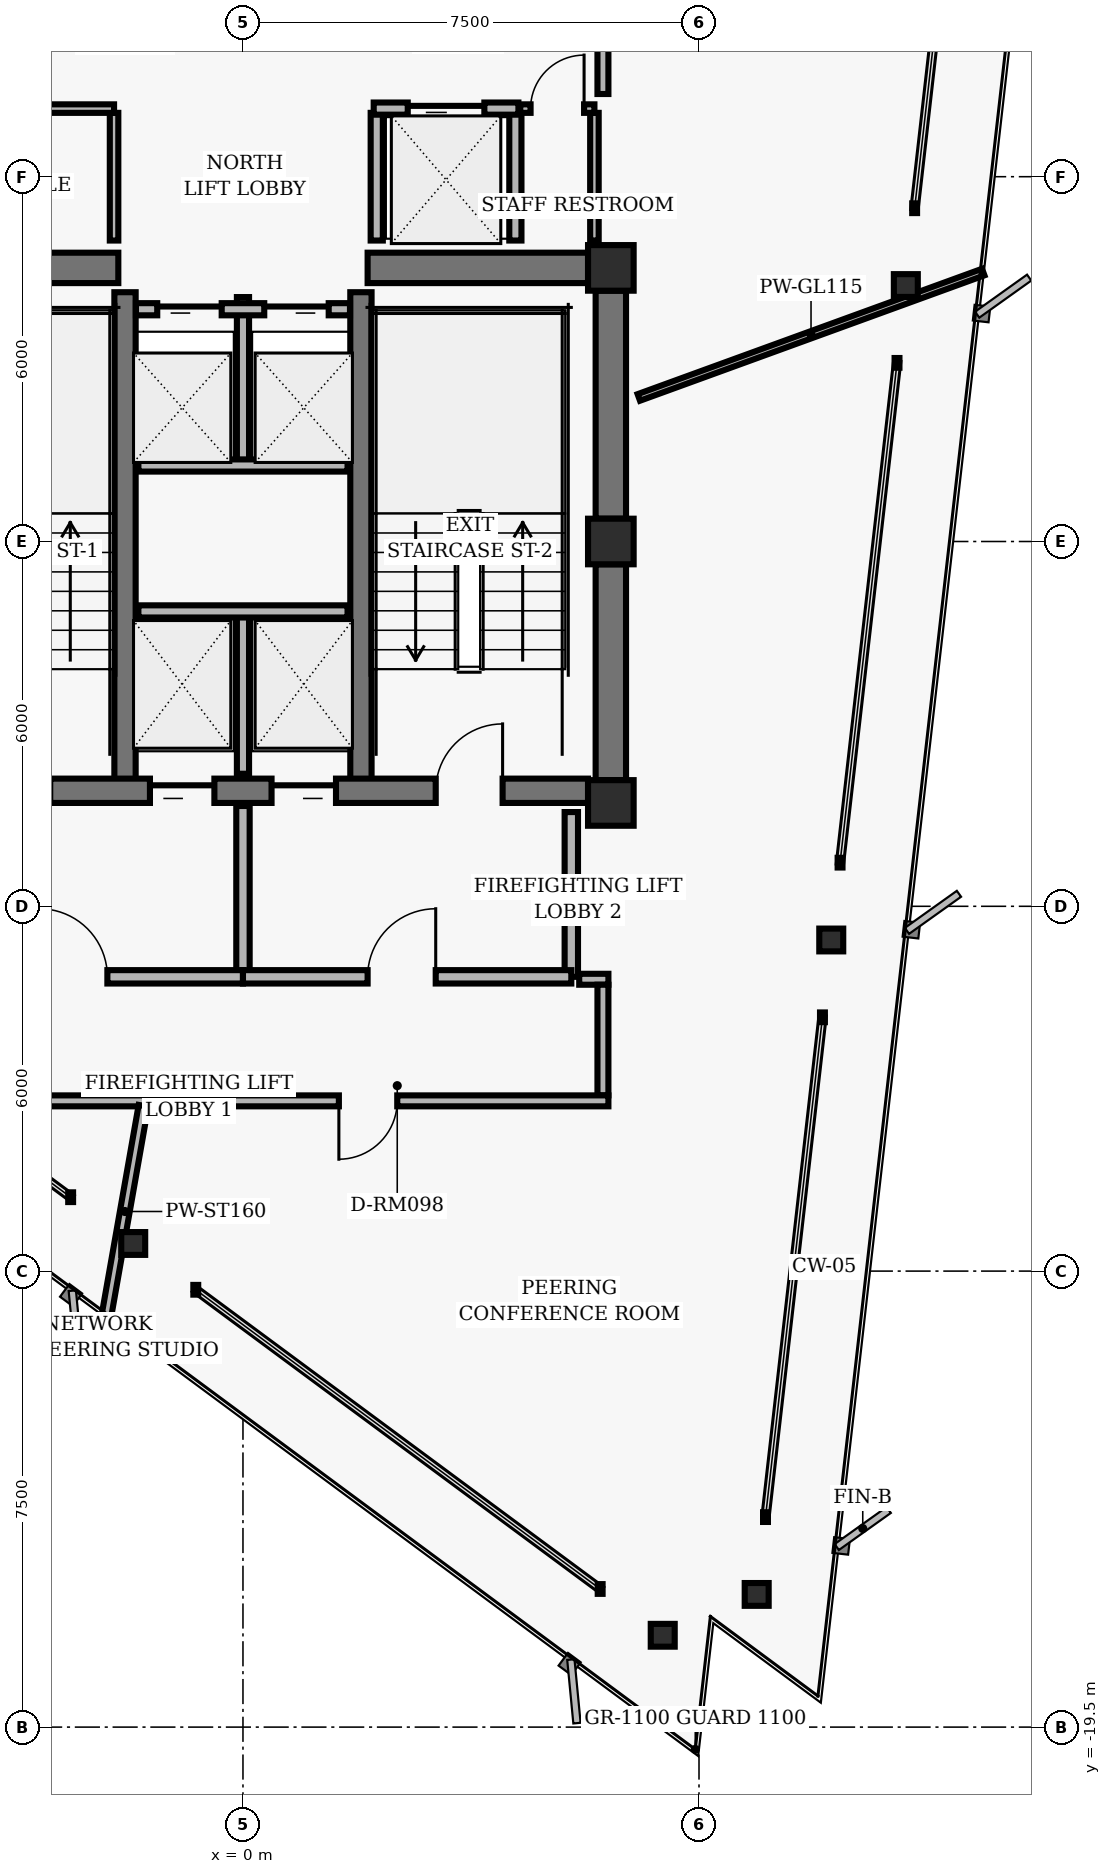
"""IFC4 building model, lengths in metres.
Left out: names, types, materials, properties, quantities, classifications, styles, units other than length and angle.
Written with IfcOpenShell. Run it as: python <this file> out.ifc"""

import sys

from ifc_helpers import new_model, si_unit, direction, frame, frame_2d, origin, origin_2d, place, context, subcontext, project, spatial, rectangle, hollow_rectangle, i_section, extrude, element, fill, save


model = new_model("IFC4")
c1 = context("Model", 3, precision=1e-05, world=origin(), true_north=direction((0.0, 1.0)))
c2 = subcontext(c1, "Body", "Model", "MODEL_VIEW")
j1 = project(units=[si_unit("LENGTHUNIT", "METRE"), si_unit("PLANEANGLEUNIT", "RADIAN")], contexts=[c1])
p1 = place(None, origin())
s1 = spatial("IfcSite", under=j1, at=p1, CompositionType="ELEMENT")
p2 = place(p1, origin())
s2 = spatial("IfcBuilding", under=s1, at=p2, CompositionType="ELEMENT")
p3 = place(p2, frame((0.0, 0.0, 214.88)))
s3 = spatial("IfcBuildingStorey", under=s2, at=p3, CompositionType="ELEMENT", Elevation=214.88)
for number, where, z_axis, x_axis in (
    (1, (6.05, 4.5, 0.0), (0.0, 0.0, 1.0), (1.0, 0.0, 0.0)),
    (2, (6.05, 0.0, 0.0), (0.0, 0.0, 1.0), (1.0, 0.0, 0.0)),
    (3, (6.05, -4.3, 0.0), (0.0, 0.0, 1.0), (1.0, 0.0, 0.0)),
):
    element("IfcColumn", number, at=place(p3, frame(where, z_axis=z_axis, x_axis=x_axis)), inside=s3, PredefinedType="COLUMN", context=c2, shape_type="SweptSolid", body=[
        extrude(hollow_rectangle(XDim=0.75, YDim=0.75, WallThickness=0.05, InnerFilletRadius=0.02, OuterFilletRadius=0.04, at=origin_2d()), origin(), (0.0, 0.0, 1.0), 3.04),
    ])
p4 = place(p3, frame((6.05, 0.375, 0.0), z_axis=(0.0, 0.0, 1.0), x_axis=(0.0, 1.0, 0.0)))
e4 = element("IfcWall", 4, at=p4, inside=s3, PredefinedType="SHEAR", context=c2, shape_type="SweptSolid", body=[
    extrude(rectangle(XDim=3.75, YDim=0.5, at=frame_2d((1.875, 0.0))), origin(), (0.0, 0.0, 1.0), 2.798),
])
p5 = place(p3, frame((6.05, -3.925, 0.0), z_axis=(0.0, 0.0, 1.0), x_axis=(0.0, 1.0, 0.0)))
e5 = element("IfcWall", 5, at=p5, inside=s3, PredefinedType="SHEAR", context=c2, shape_type="SweptSolid", body=[
    extrude(rectangle(XDim=3.55, YDim=0.5, at=frame_2d((1.775, 0.0))), origin(), (0.0, 0.0, 1.0), 2.798),
])
for number, where, z_axis, x_axis in (
    (6, (-1.94, -4.1, 0.0), (0.0, 0.0, 1.0), (0.0, 1.0, 0.0)),
    (7, (1.94, -4.1, 0.0), (0.0, 0.0, 1.0), (0.0, 1.0, 0.0)),
):
    element("IfcWall", number, at=place(p3, frame(where, z_axis=z_axis, x_axis=x_axis)), inside=s3, PredefinedType="SHEAR", context=c2, shape_type="SweptSolid", body=[
        extrude(rectangle(XDim=8.2, YDim=0.35, at=frame_2d((4.1, 0.0))), origin(), (0.0, 0.0, 1.0), 2.798),
    ])
p6 = place(p3, frame((-5.675, -4.1, 0.0), z_axis=(0.0, 0.0, 1.0), x_axis=(1.0, 0.0, 0.0)))
e8 = element("IfcWall", 8, at=p6, inside=s3, PredefinedType="SHEAR", context=c2, shape_type="SweptSolid", body=[
    extrude(rectangle(XDim=11.35, YDim=0.4, at=frame_2d((5.675, 0.0))), origin(), (0.0, 0.0, 1.0), 2.798),
])
p7 = place(p6, frame((1.405, 0.0, 0.0)))
e9 = element("IfcOpeningElement", 9, at=p7, cuts=e8, PredefinedType="OPENING", context=c2, shape_type="SweptSolid", body=[
    extrude(rectangle(XDim=1.1, YDim=2.04, at=frame_2d((0.55, 1.02))), frame((0.0, 0.21, 0.0), z_axis=(0.0, -1.0, 0.0), x_axis=(1.0, 0.0, 0.0)), (0.0, 0.0, 1.0), 0.42),
])
p8 = place(p6, frame((8.845, 0.0, 0.0)))
e10 = element("IfcOpeningElement", 10, at=p8, cuts=e8, PredefinedType="OPENING", context=c2, shape_type="SweptSolid", body=[
    extrude(rectangle(XDim=1.1, YDim=2.04, at=frame_2d((0.55, 1.02))), frame((0.0, 0.21, 0.0), z_axis=(0.0, -1.0, 0.0), x_axis=(1.0, 0.0, 0.0)), (0.0, 0.0, 1.0), 0.42),
])
p9 = place(p6, frame((4.145, 0.0, 0.0)))
e11 = element("IfcOpeningElement", 11, at=p9, cuts=e8, PredefinedType="OPENING", context=c2, shape_type="SweptSolid", body=[
    extrude(rectangle(XDim=1.06, YDim=2.04, at=frame_2d((0.53, 1.02))), frame((0.0, 0.21, 0.0), z_axis=(0.0, -1.0, 0.0), x_axis=(1.0, 0.0, 0.0)), (0.0, 0.0, 1.0), 0.42),
])
p10 = place(p6, frame((6.145, 0.0, 0.0)))
e12 = element("IfcOpeningElement", 12, at=p10, cuts=e8, PredefinedType="OPENING", context=c2, shape_type="SweptSolid", body=[
    extrude(rectangle(XDim=1.06, YDim=2.04, at=frame_2d((0.53, 1.02))), frame((0.0, 0.21, 0.0), z_axis=(0.0, -1.0, 0.0), x_axis=(1.0, 0.0, 0.0)), (0.0, 0.0, 1.0), 0.42),
])
for number, where, z_axis, x_axis in (
    (13, (-5.675, 4.5, 0.0), (0.0, 0.0, 1.0), (1.0, 0.0, 0.0)),
    (14, (2.05, 4.5, 0.0), (0.0, 0.0, 1.0), (1.0, 0.0, 0.0)),
):
    element("IfcWall", number, at=place(p3, frame(where, z_axis=z_axis, x_axis=x_axis)), inside=s3, PredefinedType="SHEAR", context=c2, shape_type="SweptSolid", body=[
        extrude(rectangle(XDim=3.625, YDim=0.5, at=frame_2d((1.812, 0.0))), origin(), (0.0, 0.0, 1.0), 2.798),
    ])
for number, where, z_axis, x_axis in (
    (15, (8.448, -17.318, 0.0), (0.0, 0.0, 1.0), (1.0, 0.0, 0.0)),
    (16, (9.675, -6.554, 0.0), (0.0, 0.0, 1.0), (1.0, 0.0, 0.0)),
    (17, (10.901, 4.21, 0.0), (0.0, 0.0, 1.0), (1.0, 0.0, 0.0)),
    (18, (-1.805, -11.546, 0.0), (0.0, 0.0, 1.0), (1.0, 0.0, 0.0)),
    (19, (6.903, -17.99, 0.0), (0.0, 0.0, 1.0), (1.0, 0.0, 0.0)),
):
    element("IfcColumn", number, at=place(p3, frame(where, z_axis=z_axis, x_axis=x_axis)), inside=s3, PredefinedType="COLUMN", context=c2, shape_type="SweptSolid", body=[
        extrude(i_section(OverallWidth=0.394, OverallDepth=0.375, WebThickness=0.017, FlangeThickness=0.028, FilletRadius=0.016, at=origin_2d()), origin(), (0.0, 0.0, 1.0), 3.04),
    ])
p11 = place(p3, frame((0.0, -3.82, 0.0), z_axis=(0.0, 0.0, 1.0), x_axis=(0.0, 1.0, 0.0)))
e20 = element("IfcWall", 20, at=p11, inside=s3, PredefinedType="PARTITIONING", context=c2, shape_type="SweptSolid", body=[
    extrude(rectangle(XDim=2.67, YDim=0.2, at=frame_2d((1.335, 0.0))), origin(), (0.0, 0.0, 1.0), 2.773),
])
p12 = place(p3, frame((-1.72, -1.15, 0.0), z_axis=(0.0, 0.0, 1.0), x_axis=(1.0, 0.0, 0.0)))
e21 = element("IfcWall", 21, at=p12, inside=s3, PredefinedType="PARTITIONING", context=c2, shape_type="SweptSolid", body=[
    extrude(rectangle(XDim=3.44, YDim=0.2, at=frame_2d((1.72, 0.0))), origin(), (0.0, 0.0, 1.0), 2.773),
])
p13 = place(p3, frame((5.4, -7.16, 0.0), z_axis=(0.0, 0.0, 1.0), x_axis=(0.0, 1.0, 0.0)))
e22 = element("IfcWall", 22, at=p13, inside=s3, PredefinedType="PARTITIONING", context=c2, shape_type="SweptSolid", body=[
    extrude(rectangle(XDim=2.71, YDim=0.22, at=frame_2d((1.355, 0.0))), origin(), (0.0, 0.0, 1.0), 2.773),
])
p14 = place(p3, frame((0.0, -7.16, 0.0), z_axis=(0.0, 0.0, 1.0), x_axis=(0.0, 1.0, 0.0)))
e23 = element("IfcWall", 23, at=p14, inside=s3, PredefinedType="PARTITIONING", context=c2, shape_type="SweptSolid", body=[
    extrude(rectangle(XDim=2.81, YDim=0.22, at=frame_2d((1.405, 0.0))), origin(), (0.0, 0.0, 1.0), 2.773),
])
p15 = place(p3, frame((-5.4, -7.16, 0.0), z_axis=(0.0, 0.0, 1.0), x_axis=(1.0, 0.0, 0.0)))
e24 = element("IfcWall", 24, at=p15, inside=s3, PredefinedType="PARTITIONING", context=c2, shape_type="SweptSolid", body=[
    extrude(rectangle(XDim=5.4, YDim=0.22, at=frame_2d((2.7, 0.0))), origin(), (0.0, 0.0, 1.0), 2.395),
])
p16 = place(p15, frame((2.05, 0.0, 0.0)))
e25 = element("IfcOpeningElement", 25, at=p16, cuts=e24, PredefinedType="OPENING", context=c2, shape_type="SweptSolid", body=[
    extrude(rectangle(XDim=1.12, YDim=2.02, at=frame_2d((0.56, 1.01))), frame((0.0, 0.12, 0.0), z_axis=(0.0, -1.0, 0.0), x_axis=(1.0, 0.0, 0.0)), (0.0, 0.0, 1.0), 0.24),
])
p17 = place(p3, frame((0.0, -7.16, 0.0), z_axis=(0.0, 0.0, 1.0), x_axis=(1.0, 0.0, 0.0)))
e26 = element("IfcWall", 26, at=p17, inside=s3, PredefinedType="PARTITIONING", context=c2, shape_type="SweptSolid", body=[
    extrude(rectangle(XDim=5.4, YDim=0.22, at=frame_2d((2.7, 0.0))), origin(), (0.0, 0.0, 1.0), 2.773),
])
p18 = place(p17, frame((2.05, 0.0, 0.0)))
e27 = element("IfcOpeningElement", 27, at=p18, cuts=e26, PredefinedType="OPENING", context=c2, shape_type="SweptSolid", body=[
    extrude(rectangle(XDim=1.12, YDim=2.02, at=frame_2d((0.56, 1.01))), frame((0.0, 0.12, 0.0), z_axis=(0.0, -1.0, 0.0), x_axis=(1.0, 0.0, 0.0)), (0.0, 0.0, 1.0), 0.24),
])
p19 = place(p3, frame((0.0, 1.25, 0.0), z_axis=(0.0, 0.0, 1.0), x_axis=(0.0, 1.0, 0.0)))
e28 = element("IfcWall", 28, at=p19, inside=s3, PredefinedType="PARTITIONING", context=c2, shape_type="SweptSolid", body=[
    extrude(rectangle(XDim=2.77, YDim=0.2, at=frame_2d((1.385, 0.0))), origin(), (0.0, 0.0, 1.0), 2.773),
])
p20 = place(p3, frame((-1.72, 1.25, 0.0), z_axis=(0.0, 0.0, 1.0), x_axis=(1.0, 0.0, 0.0)))
e29 = element("IfcWall", 29, at=p20, inside=s3, PredefinedType="PARTITIONING", context=c2, shape_type="SweptSolid", body=[
    extrude(rectangle(XDim=3.44, YDim=0.2, at=frame_2d((1.72, 0.0))), origin(), (0.0, 0.0, 1.0), 2.773),
])
p21 = place(p3, frame((-1.76, 3.82, 0.0), z_axis=(0.0, 0.0, 1.0), x_axis=(1.0, 0.0, 0.0)))
e30 = element("IfcWall", 30, at=p21, inside=s3, PredefinedType="PARTITIONING", context=c2, shape_type="SweptSolid", body=[
    extrude(rectangle(XDim=3.52, YDim=0.2, at=frame_2d((1.76, 0.0))), origin(), (0.0, 0.0, 1.0), 2.773),
])
p22 = place(p21, frame((0.35, 0.0, 0.0)))
e31 = element("IfcOpeningElement", 31, at=p22, cuts=e30, PredefinedType="OPENING", context=c2, shape_type="SweptSolid", body=[
    extrude(rectangle(XDim=1.06, YDim=2.04, at=frame_2d((0.53, 1.02))), frame((0.0, 0.11, 0.0), z_axis=(0.0, -1.0, 0.0), x_axis=(1.0, 0.0, 0.0)), (0.0, 0.0, 1.0), 0.22),
])
p23 = place(p21, frame((2.11, 0.0, 0.0)))
e32 = element("IfcOpeningElement", 32, at=p23, cuts=e30, PredefinedType="OPENING", context=c2, shape_type="SweptSolid", body=[
    extrude(rectangle(XDim=1.06, YDim=2.04, at=frame_2d((0.53, 1.02))), frame((0.0, 0.11, 0.0), z_axis=(0.0, -1.0, 0.0), x_axis=(1.0, 0.0, 0.0)), (0.0, 0.0, 1.0), 0.22),
])
for number, where, z_axis, x_axis in (
    (33, (2.2, 4.95, 0.0), (0.0, 0.0, 1.0), (0.0, 1.0, 0.0)),
    (34, (4.48, 4.95, 0.0), (0.0, 0.0, 1.0), (0.0, 1.0, 0.0)),
):
    element("IfcWall", number, at=place(p3, frame(where, z_axis=z_axis, x_axis=x_axis)), inside=s3, PredefinedType="PARTITIONING", context=c2, shape_type="SweptSolid", body=[
        extrude(rectangle(XDim=2.1, YDim=0.2, at=frame_2d((1.05, 0.0))), origin(), (0.0, 0.0, 1.0), 2.773),
    ])
p24 = place(p3, frame((2.15, 7.12, 0.0), z_axis=(0.0, 0.0, 1.0), x_axis=(1.0, 0.0, 0.0)))
e35 = element("IfcWall", 35, at=p24, inside=s3, PredefinedType="PARTITIONING", context=c2, shape_type="SweptSolid", body=[
    extrude(rectangle(XDim=2.38, YDim=0.2, at=frame_2d((1.19, 0.0))), origin(), (0.0, 0.0, 1.0), 2.395),
])
p25 = place(p24, frame((0.56, 0.0, 0.0)))
e36 = element("IfcOpeningElement", 36, at=p25, cuts=e35, PredefinedType="OPENING", context=c2, shape_type="SweptSolid", body=[
    extrude(rectangle(XDim=1.26, YDim=2.06, at=frame_2d((0.63, 1.03))), frame((0.0, 0.11, 0.0), z_axis=(0.0, -1.0, 0.0), x_axis=(1.0, 0.0, 0.0)), (0.0, 0.0, 1.0), 0.22),
])
p26 = place(p3, frame((-2.12, 4.95, 0.0), z_axis=(0.0, 0.0, 1.0), x_axis=(0.0, 1.0, 0.0)))
e37 = element("IfcWall", 37, at=p26, inside=s3, PredefinedType="PARTITIONING", context=c2, shape_type="SweptSolid", body=[
    extrude(rectangle(XDim=2.1, YDim=0.14, at=frame_2d((1.05, 0.0))), origin(), (0.0, 0.0, 1.0), 2.773),
])
p27 = place(p3, frame((-5.48, 7.12, 0.0), z_axis=(0.0, 0.0, 1.0), x_axis=(1.0, 0.0, 0.0)))
e38 = element("IfcWall", 38, at=p27, inside=s3, PredefinedType="PARTITIONING", context=c2, shape_type="SweptSolid", body=[
    extrude(rectangle(XDim=3.36, YDim=0.14, at=frame_2d((1.68, 0.0))), origin(), (0.0, 0.0, 1.0), 2.395),
])
p28 = place(p27, frame((1.24, 0.0, 0.0)))
e39 = element("IfcOpeningElement", 39, at=p28, cuts=e38, PredefinedType="OPENING", context=c2, shape_type="SweptSolid", body=[
    extrude(rectangle(XDim=0.88, YDim=2.02, at=frame_2d((0.44, 1.01))), frame((0.0, 0.08, 0.0), z_axis=(0.0, -1.0, 0.0), x_axis=(1.0, 0.0, 0.0)), (0.0, 0.0, 1.0), 0.16),
])
p29 = place(p3, frame((5.78, 4.95, 0.0), z_axis=(0.0, 0.0, 1.0), x_axis=(0.0, 1.0, 0.0)))
e40 = element("IfcWall", 40, at=p29, inside=s3, PredefinedType="PARTITIONING", context=c2, shape_type="SweptSolid", body=[
    extrude(rectangle(XDim=2.1, YDim=0.14, at=frame_2d((1.05, 0.0))), origin(), (0.0, 0.0, 1.0), 2.773),
])
p30 = place(p3, frame((4.56, 7.12, 0.0), z_axis=(0.0, 0.0, 1.0), x_axis=(1.0, 0.0, 0.0)))
e41 = element("IfcWall", 41, at=p30, inside=s3, PredefinedType="PARTITIONING", context=c2, shape_type="SweptSolid", body=[
    extrude(rectangle(XDim=1.22, YDim=0.14, at=frame_2d((0.61, 0.0))), origin(), (0.0, 0.0, 1.0), 2.773),
])
p31 = place(p30, frame((0.17, 0.0, 0.0)))
e42 = element("IfcOpeningElement", 42, at=p31, cuts=e41, PredefinedType="OPENING", context=c2, shape_type="SweptSolid", body=[
    extrude(rectangle(XDim=0.88, YDim=2.02, at=frame_2d((0.44, 1.01))), frame((0.0, 0.08, 0.0), z_axis=(0.0, -1.0, 0.0), x_axis=(1.0, 0.0, 0.0)), (0.0, 0.0, 1.0), 0.16),
])
p32 = place(p3, frame((5.92, 9.16, 0.0), z_axis=(0.0, 0.0, 1.0), x_axis=(0.0, -1.0, 0.0)))
e43 = element("IfcWall", 43, at=p32, inside=s3, PredefinedType="PARTITIONING", context=c2, shape_type="SweptSolid", body=[
    extrude(rectangle(XDim=1.8, YDim=0.18, at=frame_2d((0.9, 0.0))), origin(), (0.0, 0.0, 1.0), 2.773),
])
p33 = place(p3, frame((5.53, -7.2, 0.0), z_axis=(0.0, 0.0, 1.0), x_axis=(1.0, 0.0, 0.0)))
e44 = element("IfcWall", 44, at=p33, inside=s3, PredefinedType="PARTITIONING", context=c2, shape_type="SweptSolid", body=[
    extrude(rectangle(XDim=0.48, YDim=0.18, at=frame_2d((0.24, 0.0))), origin(), (0.0, 0.0, 1.0), 2.773),
])
p34 = place(p3, frame((5.92, -7.29, 0.0), z_axis=(0.0, 0.0, 1.0), x_axis=(0.0, -1.0, 0.0)))
e45 = element("IfcWall", 45, at=p34, inside=s3, PredefinedType="PARTITIONING", context=c2, shape_type="SweptSolid", body=[
    extrude(rectangle(XDim=1.82, YDim=0.18, at=frame_2d((0.91, 0.0))), origin(), (0.0, 0.0, 1.0), 2.253),
])
p35 = place(p3, frame((6.01, -9.2, 0.0), z_axis=(0.0, 0.0, 1.0), x_axis=(-1.0, 0.0, 0.0)))
e46 = element("IfcWall", 46, at=p35, inside=s3, PredefinedType="PARTITIONING", context=c2, shape_type="SweptSolid", body=[
    extrude(rectangle(XDim=12.84, YDim=0.18, at=frame_2d((6.42, 0.0))), origin(), (0.0, 0.0, 1.0), 2.773),
])
p36 = place(p35, frame((9.634, 0.0, 0.0)))
e47 = element("IfcOpeningElement", 47, at=p36, cuts=e46, PredefinedType="OPENING", context=c2, shape_type="SweptSolid", body=[
    extrude(rectangle(XDim=0.96, YDim=2.02, at=frame_2d((0.48, 1.01))), frame((0.0, 0.1, 0.0), z_axis=(0.0, -1.0, 0.0), x_axis=(1.0, 0.0, 0.0)), (0.0, 0.0, 1.0), 0.2),
])
p37 = place(p35, frame((3.473, 0.0, 0.0)))
e48 = element("IfcOpeningElement", 48, at=p37, cuts=e46, PredefinedType="OPENING", context=c2, shape_type="SweptSolid", body=[
    extrude(rectangle(XDim=0.96, YDim=2.02, at=frame_2d((0.48, 1.01))), frame((0.0, 0.1, 0.0), z_axis=(0.0, -1.0, 0.0), x_axis=(1.0, 0.0, 0.0)), (0.0, 0.0, 1.0), 0.2),
])
p38 = place(p3, frame((-1.636, -9.28, 0.0), z_axis=(0.0, 0.0, 1.0), x_axis=(-0.17367100135, -0.984803728308, 0.0)))
e49 = element("IfcWall", 49, at=p38, inside=s3, PredefinedType="PARTITIONING", context=c2, shape_type="SweptSolid", body=[
    extrude(rectangle(XDim=3.533, YDim=0.16, at=frame_2d((1.766, 0.0))), origin(), (0.0, 0.0, 1.0), 2.773),
])
p39 = place(p3, frame((6.51, 2.369, 0.0), z_axis=(0.0, 0.0, 1.0), x_axis=(0.939690503952, 0.342025959222, 0.0)))
e50 = element("IfcWall", 50, at=p39, inside=s3, PredefinedType="MOVABLE", context=c2, shape_type="SweptSolid", body=[
    extrude(rectangle(XDim=6.028, YDim=0.115, at=frame_2d((3.014, 0.0))), origin(), (0.0, 0.0, 1.0), 2.773),
])
p40 = place(p8, origin())
e51 = element("IfcDoor", 51, at=p40, inside=s3, OperationType="SINGLE_SWING_RIGHT", PredefinedType="DOOR", context=c2, shape_type="SweptSolid", body=[
    extrude(rectangle(XDim=1.1, YDim=2.04, at=frame_2d((0.55, 1.02))), frame((0.0, 0.025, 0.0), z_axis=(0.0, -1.0, 0.0), x_axis=(1.0, 0.0, 0.0)), (0.0, 0.0, 1.0), 0.05),
])
fill(e10, e51)
p41 = place(p9, origin())
e52 = element("IfcDoor", 52, at=p41, inside=s3, OperationType="SLIDING_TO_LEFT", PredefinedType="DOOR", context=c2, shape_type="SweptSolid", body=[
    extrude(rectangle(XDim=1.06, YDim=2.04, at=frame_2d((0.53, 1.02))), frame((0.0, 0.025, 0.0), z_axis=(0.0, -1.0, 0.0), x_axis=(1.0, 0.0, 0.0)), (0.0, 0.0, 1.0), 0.05),
])
fill(e11, e52)
p42 = place(p10, origin())
e53 = element("IfcDoor", 53, at=p42, inside=s3, OperationType="SLIDING_TO_RIGHT", PredefinedType="DOOR", context=c2, shape_type="SweptSolid", body=[
    extrude(rectangle(XDim=1.06, YDim=2.04, at=frame_2d((0.53, 1.02))), frame((0.0, 0.025, 0.0), z_axis=(0.0, -1.0, 0.0), x_axis=(1.0, 0.0, 0.0)), (0.0, 0.0, 1.0), 0.05),
])
fill(e12, e53)
p43 = place(p16, origin())
e54 = element("IfcDoor", 54, at=p43, inside=s3, OperationType="SINGLE_SWING_LEFT", PredefinedType="DOOR", context=c2, shape_type="SweptSolid", body=[
    extrude(rectangle(XDim=1.12, YDim=2.02, at=frame_2d((0.56, 1.01))), frame((0.0, 0.025, 0.0), z_axis=(0.0, -1.0, 0.0), x_axis=(1.0, 0.0, 0.0)), (0.0, 0.0, 1.0), 0.05),
])
fill(e25, e54)
p44 = place(p18, origin())
e55 = element("IfcDoor", 55, at=p44, inside=s3, OperationType="SINGLE_SWING_RIGHT", PredefinedType="DOOR", context=c2, shape_type="SweptSolid", body=[
    extrude(rectangle(XDim=1.12, YDim=2.02, at=frame_2d((0.56, 1.01))), frame((0.0, 0.025, 0.0), z_axis=(0.0, -1.0, 0.0), x_axis=(1.0, 0.0, 0.0)), (0.0, 0.0, 1.0), 0.05),
])
fill(e27, e55)
p45 = place(p22, origin())
e56 = element("IfcDoor", 56, at=p45, inside=s3, OperationType="SLIDING_TO_LEFT", PredefinedType="DOOR", context=c2, shape_type="SweptSolid", body=[
    extrude(rectangle(XDim=1.06, YDim=2.04, at=frame_2d((0.53, 1.02))), frame((0.0, 0.025, 0.0), z_axis=(0.0, -1.0, 0.0), x_axis=(1.0, 0.0, 0.0)), (0.0, 0.0, 1.0), 0.05),
])
fill(e31, e56)
p46 = place(p23, origin())
e57 = element("IfcDoor", 57, at=p46, inside=s3, OperationType="SLIDING_TO_RIGHT", PredefinedType="DOOR", context=c2, shape_type="SweptSolid", body=[
    extrude(rectangle(XDim=1.06, YDim=2.04, at=frame_2d((0.53, 1.02))), frame((0.0, 0.025, 0.0), z_axis=(0.0, -1.0, 0.0), x_axis=(1.0, 0.0, 0.0)), (0.0, 0.0, 1.0), 0.05),
])
fill(e32, e57)
p47 = place(p25, origin())
e58 = element("IfcDoor", 58, at=p47, inside=s3, OperationType="SLIDING_TO_LEFT", PredefinedType="DOOR", context=c2, shape_type="SweptSolid", body=[
    extrude(rectangle(XDim=1.26, YDim=2.06, at=frame_2d((0.63, 1.03))), frame((0.0, 0.025, 0.0), z_axis=(0.0, -1.0, 0.0), x_axis=(1.0, 0.0, 0.0)), (0.0, 0.0, 1.0), 0.05),
])
fill(e36, e58)
p48 = place(p31, origin())
e59 = element("IfcDoor", 59, at=p48, inside=s3, OperationType="SINGLE_SWING_RIGHT", PredefinedType="DOOR", context=c2, shape_type="SweptSolid", body=[
    extrude(rectangle(XDim=0.88, YDim=2.02, at=frame_2d((0.44, 1.01))), frame((0.0, 0.025, 0.0), z_axis=(0.0, -1.0, 0.0), x_axis=(1.0, 0.0, 0.0)), (0.0, 0.0, 1.0), 0.05),
])
fill(e42, e59)
p49 = place(p37, origin())
e60 = element("IfcDoor", 60, at=p49, inside=s3, OperationType="SINGLE_SWING_RIGHT", PredefinedType="DOOR", context=c2, shape_type="SweptSolid", body=[
    extrude(rectangle(XDim=0.96, YDim=2.02, at=frame_2d((0.48, 1.01))), frame((0.0, 0.025, 0.0), z_axis=(0.0, -1.0, 0.0), x_axis=(1.0, 0.0, 0.0)), (0.0, 0.0, 1.0), 0.05),
])
fill(e48, e60)
save(model, sys.argv[1])
